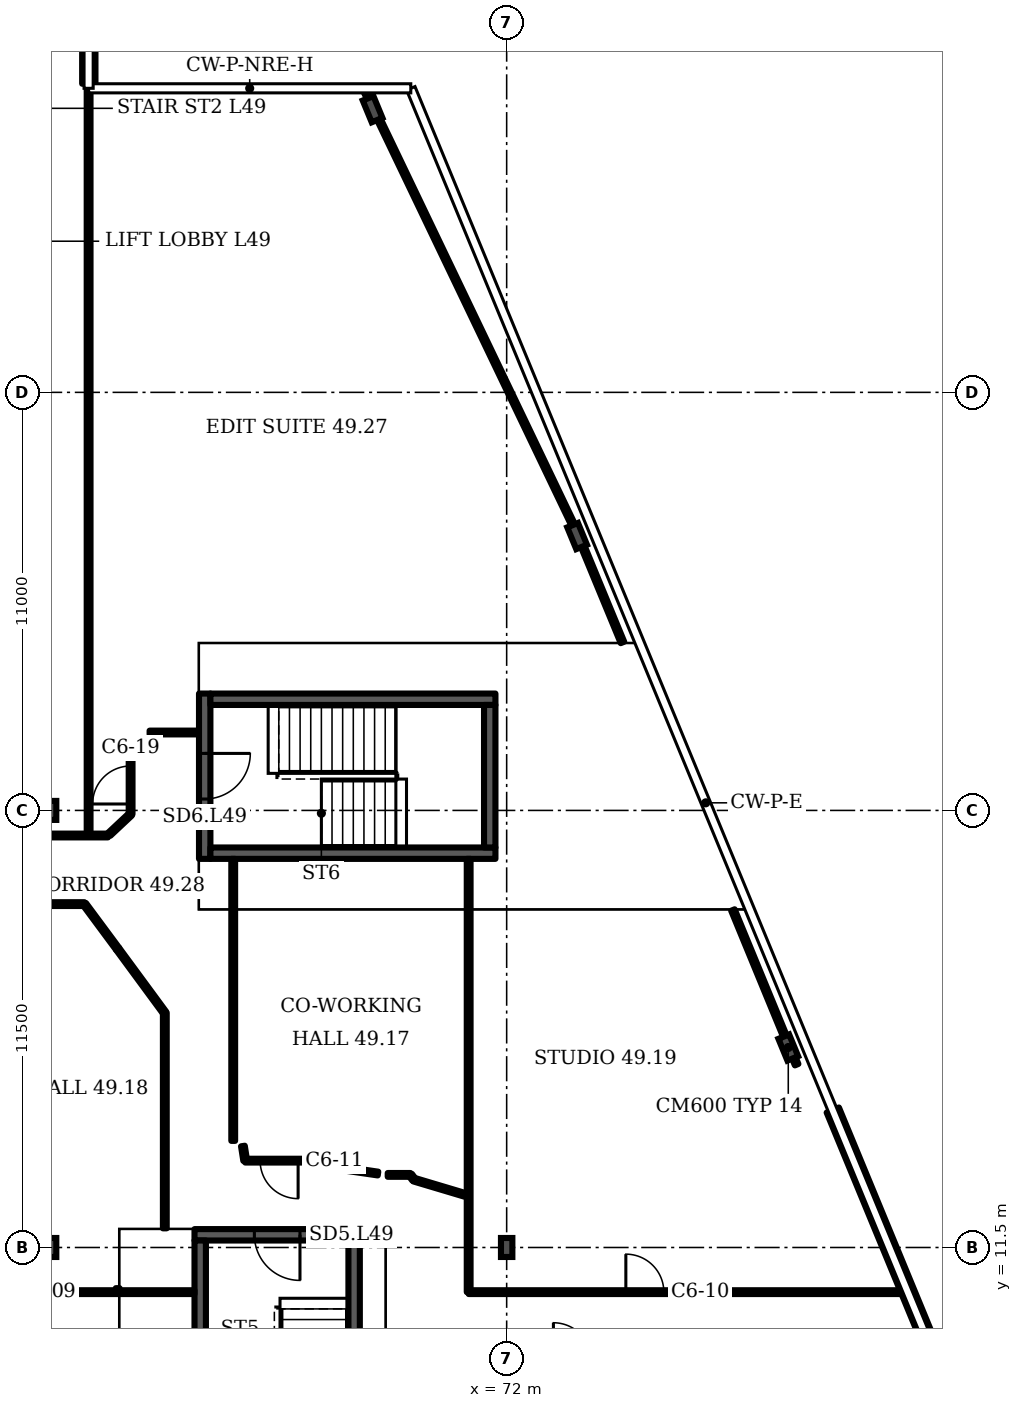
"""IFC4 building model, lengths in metres.
Left out: names, types, materials, properties, quantities, classifications, styles, units other than length and angle.
Written with IfcOpenShell. Run it as: python <this file> out.ifc"""

import sys

from ifc_helpers import new_model, si_unit, direction, frame, frame_2d, origin, origin_2d, place, context, subcontext, project, spatial, rectangle, i_section, extrude, element, fill, save


model = new_model("IFC4")
c1 = context("Model", 3, precision=1e-05, world=origin(), true_north=direction((0.0, 1.0)))
c2 = subcontext(c1, "Body", "Model", "MODEL_VIEW")
j1 = project(units=[si_unit("LENGTHUNIT", "METRE"), si_unit("PLANEANGLEUNIT", "RADIAN")], contexts=[c1])
p1 = place(None, origin())
s1 = spatial("IfcSite", under=j1, at=p1, CompositionType="ELEMENT")
p2 = place(p1, origin())
s2 = spatial("IfcBuilding", under=s1, at=p2, CompositionType="ELEMENT")
p3 = place(p2, frame((0.0, 0.0, 198.7)))
s3 = spatial("IfcBuildingStorey", under=s2, at=p3, CompositionType="ELEMENT", Elevation=198.7)
for number, where, z_axis, x_axis in (
    (1, (79.41, 16.762, 0.0), (0.0, 0.0, 1.0), (0.924, 0.382, 0.0)),
    (2, (73.854, 30.219, 0.0), (0.0, 0.0, 1.0), (0.924, 0.382, 0.0)),
    (3, (68.472, 41.45, 0.0), (0.0, 0.0, 1.0), (0.924, 0.382, 0.0)),
):
    element("IfcColumn", number, at=place(p3, frame(where, z_axis=z_axis, x_axis=x_axis)), inside=s3, PredefinedType="COLUMN", context=c2, shape_type="SweptSolid", body=[
        extrude(i_section(OverallWidth=0.305, OverallDepth=0.62, WebThickness=0.021, FlangeThickness=0.04, FilletRadius=0.027, at=origin_2d()), origin(), (0.0, 0.0, 1.0), 3.6),
    ])
for number, where, z_axis, x_axis in (
    (4, (60.0, 11.5, 0.0), (0.0, 0.0, 1.0), (1.0, 0.0, 0.0)),
    (5, (72.0, 11.5, 0.0), (0.0, 0.0, 1.0), (1.0, 0.0, 0.0)),
    (6, (60.0, 23.0, 0.0), (0.0, 0.0, 1.0), (1.0, 0.0, 0.0)),
):
    element("IfcColumn", number, at=place(p3, frame(where, z_axis=z_axis, x_axis=x_axis)), inside=s3, PredefinedType="COLUMN", context=c2, shape_type="SweptSolid", body=[
        extrude(i_section(OverallWidth=0.3, OverallDepth=0.5, WebThickness=0.014, FlangeThickness=0.028, FilletRadius=0.027, at=origin_2d()), origin(), (0.0, 0.0, 1.0), 3.6),
    ])
p4 = place(p3, frame((84.916, 4.616, 0.0), z_axis=(0.0, 0.0, 1.0), x_axis=(-0.381598, 0.924328, 0.0)))
e7 = element("IfcWall", 7, at=p4, inside=s3, PredefinedType="SOLIDWALL", context=c2, shape_type="SweptSolid", body=[
    extrude(rectangle(XDim=11.361, YDim=0.35, at=frame_2d((5.68, 0.0))), origin(), (0.0, 0.0, 1.0), 1.0),
])
p5 = place(p3, frame((61.005, 42.12, 0.0), z_axis=(0.0, 0.0, 1.0), x_axis=(0.0, 1.0, 0.0)))
e8 = element("IfcWall", 8, at=p5, inside=s3, PredefinedType="SOLIDWALL", context=c2, shape_type="SweptSolid", body=[
    extrude(rectangle(XDim=2.03, YDim=0.35, at=frame_2d((1.015, 0.0))), origin(), (0.0, 0.0, 1.0), 1.0),
])
p6 = place(p3, frame((63.786, 11.834, 0.0), z_axis=(0.0, 0.0, 1.0), x_axis=(1.0, 0.0, 0.0)))
e9 = element("IfcWall", 9, at=p6, inside=s3, PredefinedType="SHEAR", context=c2, shape_type="SweptSolid", body=[
    extrude(rectangle(XDim=4.35, YDim=0.3, at=frame_2d((2.175, 0.0))), origin(), (0.0, 0.0, 1.0), 3.15),
])
p7 = place(p6, frame((1.575, 0.0, 0.0)))
e10 = element("IfcOpeningElement", 10, at=p7, cuts=e9, PredefinedType="OPENING", context=c2, shape_type="SweptSolid", body=[
    extrude(rectangle(XDim=1.2, YDim=2.1, at=frame_2d((0.6, 1.05))), frame((0.0, 0.16, 0.0), z_axis=(0.0, -1.0, 0.0), x_axis=(1.0, 0.0, 0.0)), (0.0, 0.0, 1.0), 0.32),
])
p8 = place(p3, frame((64.055, 21.725, 0.0), z_axis=(0.0, 0.0, 1.0), x_axis=(0.0, 1.0, 0.0)))
e11 = element("IfcWall", 11, at=p8, inside=s3, PredefinedType="SHEAR", context=c2, shape_type="SweptSolid", body=[
    extrude(rectangle(XDim=4.35, YDim=0.3, at=frame_2d((2.175, 0.0))), origin(), (0.0, 0.0, 1.0), 3.15),
])
p9 = place(p8, frame((1.575, 0.0, 0.0)))
e12 = element("IfcOpeningElement", 12, at=p9, cuts=e11, PredefinedType="OPENING", context=c2, shape_type="SweptSolid", body=[
    extrude(rectangle(XDim=1.2, YDim=2.1, at=frame_2d((0.6, 1.05))), frame((0.0, 0.16, 0.0), z_axis=(0.0, -1.0, 0.0), x_axis=(1.0, 0.0, 0.0)), (0.0, 0.0, 1.0), 0.32),
])
p10 = place(p3, frame((18.955, 22.34, 0.0), z_axis=(0.0, 0.0, 1.0), x_axis=(1.0, 0.0, 0.0)))
e13 = element("IfcWall", 13, at=p10, inside=s3, PredefinedType="PARTITIONING", context=c2, shape_type="SweptSolid", body=[
    extrude(rectangle(XDim=42.555, YDim=0.1, at=frame_2d((21.277, 0.0))), origin(), (0.0, 0.0, 1.0), 3.15),
])
p11 = place(p10, frame((0.62, 0.0, 0.0)))
e14 = element("IfcOpeningElement", 14, at=p11, cuts=e13, PredefinedType="OPENING", context=c2, shape_type="SweptSolid", body=[
    extrude(rectangle(XDim=1.0, YDim=2.1, at=frame_2d((0.5, 1.05))), frame((0.0, 0.06, 0.0), z_axis=(0.0, -1.0, 0.0), x_axis=(1.0, 0.0, 0.0)), (0.0, 0.0, 1.0), 0.12),
])
p12 = place(p10, frame((8.62, 0.0, 0.0)))
e15 = element("IfcOpeningElement", 15, at=p12, cuts=e13, PredefinedType="OPENING", context=c2, shape_type="SweptSolid", body=[
    extrude(rectangle(XDim=1.0, YDim=2.1, at=frame_2d((0.5, 1.05))), frame((0.0, 0.06, 0.0), z_axis=(0.0, -1.0, 0.0), x_axis=(1.0, 0.0, 0.0)), (0.0, 0.0, 1.0), 0.12),
])
p13 = place(p3, frame((34.945, 10.325, 0.0), z_axis=(0.0, 0.0, 1.0), x_axis=(1.0, 0.0, 0.0)))
e16 = element("IfcWall", 16, at=p13, inside=s3, PredefinedType="PARTITIONING", context=c2, shape_type="SweptSolid", body=[
    extrude(rectangle(XDim=28.841, YDim=0.1, at=frame_2d((14.421, 0.0))), origin(), (0.0, 0.0, 1.0), 3.15),
])
p14 = place(p13, frame((22.995, 0.0, 0.0)))
e17 = element("IfcOpeningElement", 17, at=p14, cuts=e16, PredefinedType="OPENING", context=c2, shape_type="SweptSolid", body=[
    extrude(rectangle(XDim=1.0, YDim=2.1, at=frame_2d((0.5, 1.05))), frame((0.0, 0.06, 0.0), z_axis=(0.0, -1.0, 0.0), x_axis=(1.0, 0.0, 0.0)), (0.0, 0.0, 1.0), 0.12),
])
p15 = place(p3, frame((34.945, 20.535, 0.0), z_axis=(0.0, 0.0, 1.0), x_axis=(1.0, 0.0, 0.0)))
e18 = element("IfcWall", 18, at=p15, inside=s3, PredefinedType="PARTITIONING", context=c2, shape_type="SweptSolid", body=[
    extrude(rectangle(XDim=25.945, YDim=0.1, at=frame_2d((12.972, 0.0))), origin(), (0.0, 0.0, 1.0), 3.15),
])
p16 = place(p15, frame((3.5, 0.0, 0.0)))
e19 = element("IfcOpeningElement", 19, at=p16, cuts=e18, PredefinedType="OPENING", context=c2, shape_type="SweptSolid", body=[
    extrude(rectangle(XDim=1.0, YDim=2.1, at=frame_2d((0.5, 1.05))), frame((0.0, 0.06, 0.0), z_axis=(0.0, -1.0, 0.0), x_axis=(1.0, 0.0, 0.0)), (0.0, 0.0, 1.0), 0.12),
])
p17 = place(p15, frame((13.075, 0.0, 0.0)))
e20 = element("IfcOpeningElement", 20, at=p17, cuts=e18, PredefinedType="OPENING", context=c2, shape_type="SweptSolid", body=[
    extrude(rectangle(XDim=1.8, YDim=2.1, at=frame_2d((0.9, 1.05))), frame((0.0, 0.06, 0.0), z_axis=(0.0, -1.0, 0.0), x_axis=(1.0, 0.0, 0.0)), (0.0, 0.0, 1.0), 0.12),
])
p18 = place(p3, frame((61.0, 22.34, 0.0), z_axis=(0.0, 0.0, 1.0), x_axis=(0.0, 1.0, 0.0)))
e21 = element("IfcWall", 21, at=p18, inside=s3, PredefinedType="PARTITIONING", context=c2, shape_type="SweptSolid", body=[
    extrude(rectangle(XDim=19.64, YDim=0.1, at=frame_2d((9.82, 0.0))), origin(), (0.0, 0.0, 1.0), 3.15),
])
p19 = place(p3, frame((61.54, 22.37, 0.0), z_axis=(0.0, 0.0, 1.0), x_axis=(0.72944, 0.684047, 0.0)))
e22 = element("IfcWall", 22, at=p19, inside=s3, PredefinedType="PARTITIONING", context=c2, shape_type="SweptSolid", body=[
    extrude(rectangle(XDim=0.774, YDim=0.1, at=frame_2d((0.387, 0.0))), origin(), (0.0, 0.0, 1.0), 3.15),
])
p20 = place(p3, frame((61.765, 10.325, 0.0), z_axis=(0.0, 0.0, 1.0), x_axis=(0.0, 1.0, 0.0)))
e23 = element("IfcWall", 23, at=p20, inside=s3, PredefinedType="PARTITIONING", context=c2, shape_type="SweptSolid", body=[
    extrude(rectangle(XDim=0.105, YDim=0.1, at=frame_2d((0.052, 0.0))), origin(), (0.0, 0.0, 1.0), 3.15),
])
p21 = place(p3, frame((61.765, 19.355, 0.0), z_axis=(0.0, 0.0, 1.0), x_axis=(-0.595656, 0.803238, 0.0)))
e24 = element("IfcWall", 24, at=p21, inside=s3, PredefinedType="PARTITIONING", context=c2, shape_type="SweptSolid", body=[
    extrude(rectangle(XDim=1.469, YDim=0.1, at=frame_2d((0.734, 0.0))), origin(), (0.0, 0.0, 1.0), 3.15),
])
p22 = place(p3, frame((62.105, 22.9, 0.0), z_axis=(0.0, 0.0, 1.0), x_axis=(0.0, 1.0, 0.0)))
e25 = element("IfcWall", 25, at=p22, inside=s3, PredefinedType="PARTITIONING", context=c2, shape_type="SweptSolid", body=[
    extrude(rectangle(XDim=1.9, YDim=0.1, at=frame_2d((0.95, 0.0))), origin(), (0.0, 0.0, 1.0), 3.15),
])
p23 = place(p22, frame((0.269, 0.0, 0.0)))
e26 = element("IfcOpeningElement", 26, at=p23, cuts=e25, PredefinedType="OPENING", context=c2, shape_type="SweptSolid", body=[
    extrude(rectangle(XDim=1.0, YDim=2.1, at=frame_2d((0.5, 1.05))), frame((0.0, 0.06, 0.0), z_axis=(0.0, -1.0, 0.0), x_axis=(1.0, 0.0, 0.0)), (0.0, 0.0, 1.0), 0.12),
])
p24 = place(p3, frame((62.105, 24.8, 0.0), z_axis=(0.0, 0.0, 1.0), x_axis=(1.0, 0.0, 0.0)))
e27 = element("IfcWall", 27, at=p24, inside=s3, PredefinedType="PARTITIONING", context=c2, shape_type="SweptSolid", body=[
    extrude(rectangle(XDim=0.38, YDim=0.1, at=frame_2d((0.19, 0.0))), origin(), (0.0, 0.0, 1.0), 3.15),
])
p25 = place(p3, frame((62.605, 25.05, 0.0), z_axis=(0.0, 0.0, 1.0), x_axis=(1.0, 0.0, 0.0)))
e28 = element("IfcWall", 28, at=p25, inside=s3, PredefinedType="PARTITIONING", context=c2, shape_type="SweptSolid", body=[
    extrude(rectangle(XDim=1.28, YDim=0.1, at=frame_2d((0.64, 0.0))), origin(), (0.0, 0.0, 1.0), 3.15),
])
p26 = place(p3, frame((63.005, 17.67, 0.0), z_axis=(0.0, 0.0, 1.0), x_axis=(-0.592694, 0.805429, 0.0)))
e29 = element("IfcWall", 29, at=p26, inside=s3, PredefinedType="PARTITIONING", context=c2, shape_type="SweptSolid", body=[
    extrude(rectangle(XDim=2.092, YDim=0.1, at=frame_2d((1.046, 0.0))), origin(), (0.0, 0.0, 1.0), 3.15),
])
p27 = place(p3, frame((63.005, 12.004, 0.0), z_axis=(0.0, 0.0, 1.0), x_axis=(0.0, 1.0, 0.0)))
e30 = element("IfcWall", 30, at=p27, inside=s3, PredefinedType="PARTITIONING", context=c2, shape_type="SweptSolid", body=[
    extrude(rectangle(XDim=5.666, YDim=0.1, at=frame_2d((2.833, 0.0))), origin(), (0.0, 0.0, 1.0), 3.15),
])
p28 = place(p3, frame((64.805, 14.305, 0.0), z_axis=(0.0, 0.0, 1.0), x_axis=(0.0, 1.0, 0.0)))
e31 = element("IfcWall", 31, at=p28, inside=s3, PredefinedType="PARTITIONING", context=c2, shape_type="SweptSolid", body=[
    extrude(rectangle(XDim=7.42, YDim=0.1, at=frame_2d((3.71, 0.0))), origin(), (0.0, 0.0, 1.0), 3.15),
])
p29 = place(p3, frame((65.12, 13.785, 0.0), z_axis=(0.0, 0.0, 1.0), x_axis=(-0.154128, 0.988048, 0.0)))
e32 = element("IfcWall", 32, at=p29, inside=s3, PredefinedType="PARTITIONING", context=c2, shape_type="SweptSolid", body=[
    extrude(rectangle(XDim=0.39, YDim=0.1, at=frame_2d((0.195, 0.0))), origin(), (0.0, 0.0, 1.0), 3.15),
])
p30 = place(p3, frame((65.12, 13.785, 0.0), z_axis=(0.0, 0.0, 1.0), x_axis=(1.0, 0.0, 0.0)))
e33 = element("IfcWall", 33, at=p30, inside=s3, PredefinedType="PARTITIONING", context=c2, shape_type="SweptSolid", body=[
    extrude(rectangle(XDim=1.74, YDim=0.1, at=frame_2d((0.87, 0.0))), origin(), (0.0, 0.0, 1.0), 3.15),
])
p31 = place(p30, frame((0.392, 0.0, 0.0)))
e34 = element("IfcOpeningElement", 34, at=p31, cuts=e33, PredefinedType="OPENING", context=c2, shape_type="SweptSolid", body=[
    extrude(rectangle(XDim=1.0, YDim=2.1, at=frame_2d((0.5, 1.05))), frame((0.0, 0.06, 0.0), z_axis=(0.0, -1.0, 0.0), x_axis=(1.0, 0.0, 0.0)), (0.0, 0.0, 1.0), 0.12),
])
p32 = place(p3, frame((66.975, 13.685, 0.0), z_axis=(0.0, 0.0, 1.0), x_axis=(-0.755051, 0.65566, 0.0)))
e35 = element("IfcWall", 35, at=p32, inside=s3, PredefinedType="PARTITIONING", context=c2, shape_type="SweptSolid", body=[
    extrude(rectangle(XDim=0.152, YDim=0.1, at=frame_2d((0.076, 0.0))), origin(), (0.0, 0.0, 1.0), 3.15),
])
p33 = place(p3, frame((68.615, 13.445, 0.0), z_axis=(0.0, 0.0, 1.0), x_axis=(-0.989463, 0.144803, 0.0)))
e36 = element("IfcWall", 36, at=p33, inside=s3, PredefinedType="PARTITIONING", context=c2, shape_type="SweptSolid", body=[
    extrude(rectangle(XDim=1.657, YDim=0.1, at=frame_2d((0.829, 0.0))), origin(), (0.0, 0.0, 1.0), 3.15),
])
p34 = place(p3, frame((68.87, 13.41, 0.0), z_axis=(0.0, 0.0, 1.0), x_axis=(1.0, 0.0, 0.0)))
e37 = element("IfcWall", 37, at=p34, inside=s3, PredefinedType="PARTITIONING", context=c2, shape_type="SweptSolid", body=[
    extrude(rectangle(XDim=0.595, YDim=0.1, at=frame_2d((0.297, 0.0))), origin(), (0.0, 0.0, 1.0), 3.15),
])
p35 = place(p3, frame((69.56, 13.285, 0.0), z_axis=(0.0, 0.0, 1.0), x_axis=(-0.604968, 0.796256, 0.0)))
e38 = element("IfcWall", 38, at=p35, inside=s3, PredefinedType="PARTITIONING", context=c2, shape_type="SweptSolid", body=[
    extrude(rectangle(XDim=0.157, YDim=0.1, at=frame_2d((0.079, 0.0))), origin(), (0.0, 0.0, 1.0), 3.15),
])
p36 = place(p3, frame((70.9, 12.885, 0.0), z_axis=(0.0, 0.0, 1.0), x_axis=(-0.958229, 0.286002, 0.0)))
e39 = element("IfcWall", 39, at=p36, inside=s3, PredefinedType="PARTITIONING", context=c2, shape_type="SweptSolid", body=[
    extrude(rectangle(XDim=1.398, YDim=0.1, at=frame_2d((0.699, 0.0))), origin(), (0.0, 0.0, 1.0), 3.15),
])
p37 = place(p3, frame((71.0, 10.325, 0.0), z_axis=(0.0, 0.0, 1.0), x_axis=(0.0, 1.0, 0.0)))
e40 = element("IfcWall", 40, at=p37, inside=s3, PredefinedType="PARTITIONING", context=c2, shape_type="SweptSolid", body=[
    extrude(rectangle(XDim=11.4, YDim=0.1, at=frame_2d((5.7, 0.0))), origin(), (0.0, 0.0, 1.0), 3.15),
])
p38 = place(p3, frame((71.0, 10.325, 0.0), z_axis=(0.0, 0.0, 1.0), x_axis=(1.0, 0.0, 0.0)))
e41 = element("IfcWall", 41, at=p38, inside=s3, PredefinedType="PARTITIONING", context=c2, shape_type="SweptSolid", body=[
    extrude(rectangle(XDim=11.532, YDim=0.1, at=frame_2d((5.766, 0.0))), origin(), (0.0, 0.0, 1.0), 2.53),
])
p39 = place(p38, frame((4.136, 0.0, 0.0)))
e42 = element("IfcOpeningElement", 42, at=p39, cuts=e41, PredefinedType="OPENING", context=c2, shape_type="SweptSolid", body=[
    extrude(rectangle(XDim=1.0, YDim=2.1, at=frame_2d((0.5, 1.05))), frame((0.0, 0.06, 0.0), z_axis=(0.0, -1.0, 0.0), x_axis=(1.0, 0.0, 0.0)), (0.0, 0.0, 1.0), 0.12),
])
p40 = place(p3, frame((73.885, 30.23, 0.0), z_axis=(0.0, 0.0, 1.0), x_axis=(-0.432107, 0.901822, 0.0)))
e43 = element("IfcWall", 43, at=p40, inside=s3, PredefinedType="PARTITIONING", context=c2, shape_type="SweptSolid", body=[
    extrude(rectangle(XDim=13.016, YDim=0.1, at=frame_2d((6.508, 0.0))), origin(), (0.0, 0.0, 1.0), 3.15),
])
p41 = place(p3, frame((75.047, 27.42, 0.0), z_axis=(0.0, 0.0, 1.0), x_axis=(-0.382024, 0.924148, 0.0)))
e44 = element("IfcWall", 44, at=p41, inside=s3, PredefinedType="PARTITIONING", context=c2, shape_type="SweptSolid", body=[
    extrude(rectangle(XDim=3.041, YDim=0.1, at=frame_2d((1.521, 0.0))), origin(), (0.0, 0.0, 1.0), 2.53),
])
p42 = place(p3, frame((79.63, 16.31, 0.0), z_axis=(0.0, 0.0, 1.0), x_axis=(-0.380933, 0.9246, 0.0)))
e45 = element("IfcWall", 45, at=p42, inside=s3, PredefinedType="PARTITIONING", context=c2, shape_type="SweptSolid", body=[
    extrude(rectangle(XDim=4.402, YDim=0.1, at=frame_2d((2.201, 0.0))), origin(), (0.0, 0.0, 1.0), 2.53),
])
for number, where, z_axis, x_axis in (
    (46, (63.936, 4.184, 0.0), (0.0, 0.0, 1.0), (0.0, 1.0, 0.0)),
    (47, (67.986, 4.184, 0.0), (0.0, 0.0, 1.0), (0.0, 1.0, 0.0)),
    (48, (64.205, 21.875, 0.0), (0.0, 0.0, 1.0), (1.0, 0.0, 0.0)),
    (49, (64.205, 25.925, 0.0), (0.0, 0.0, 1.0), (1.0, 0.0, 0.0)),
):
    element("IfcWall", number, at=place(p3, frame(where, z_axis=z_axis, x_axis=x_axis)), inside=s3, PredefinedType="SHEAR", context=c2, shape_type="SweptSolid", body=[
        extrude(rectangle(XDim=7.5, YDim=0.3, at=frame_2d((3.75, 0.0))), origin(), (0.0, 0.0, 1.0), 3.15),
    ])
p43 = place(p3, frame((71.555, 22.025, 0.0), z_axis=(0.0, 0.0, 1.0), x_axis=(0.0, 1.0, 0.0)))
e50 = element("IfcWall", 50, at=p43, inside=s3, PredefinedType="SHEAR", context=c2, shape_type="SweptSolid", body=[
    extrude(rectangle(XDim=3.75, YDim=0.3, at=frame_2d((1.875, 0.0))), origin(), (0.0, 0.0, 1.0), 3.15),
])
p44 = place(p7, origin())
e51 = element("IfcDoor", 51, at=p44, inside=s3, OperationType="SINGLE_SWING_RIGHT", PredefinedType="DOOR", context=c2, shape_type="SweptSolid", body=[
    extrude(rectangle(XDim=1.2, YDim=2.1, at=frame_2d((0.6, 1.05))), frame((0.0, 0.025, 0.0), z_axis=(0.0, -1.0, 0.0), x_axis=(1.0, 0.0, 0.0)), (0.0, 0.0, 1.0), 0.05),
])
fill(e10, e51)
p45 = place(p9, origin())
e52 = element("IfcDoor", 52, at=p45, inside=s3, OperationType="SINGLE_SWING_RIGHT", PredefinedType="DOOR", context=c2, shape_type="SweptSolid", body=[
    extrude(rectangle(XDim=1.2, YDim=2.1, at=frame_2d((0.6, 1.05))), frame((0.0, 0.025, 0.0), z_axis=(0.0, -1.0, 0.0), x_axis=(1.0, 0.0, 0.0)), (0.0, 0.0, 1.0), 0.05),
])
fill(e12, e52)
p46 = place(p39, origin())
e53 = element("IfcDoor", 53, at=p46, inside=s3, OperationType="SINGLE_SWING_LEFT", PredefinedType="DOOR", context=c2, shape_type="SweptSolid", body=[
    extrude(rectangle(XDim=1.0, YDim=2.1, at=frame_2d((0.5, 1.05))), frame((0.0, 0.025, 0.0), z_axis=(0.0, -1.0, 0.0), x_axis=(1.0, 0.0, 0.0)), (0.0, 0.0, 1.0), 0.05),
])
fill(e42, e53)
p47 = place(p31, origin())
e54 = element("IfcDoor", 54, at=p47, inside=s3, OperationType="SINGLE_SWING_RIGHT", PredefinedType="DOOR", context=c2, shape_type="SweptSolid", body=[
    extrude(rectangle(XDim=1.0, YDim=2.1, at=frame_2d((0.5, 1.05))), frame((0.0, 0.025, 0.0), z_axis=(0.0, -1.0, 0.0), x_axis=(1.0, 0.0, 0.0)), (0.0, 0.0, 1.0), 0.05),
])
fill(e34, e54)
p48 = place(p23, origin())
e55 = element("IfcDoor", 55, at=p48, inside=s3, OperationType="SINGLE_SWING_LEFT", PredefinedType="DOOR", context=c2, shape_type="SweptSolid", body=[
    extrude(rectangle(XDim=1.0, YDim=2.1, at=frame_2d((0.5, 1.05))), frame((0.0, 0.025, 0.0), z_axis=(0.0, -1.0, 0.0), x_axis=(1.0, 0.0, 0.0)), (0.0, 0.0, 1.0), 0.05),
])
fill(e26, e55)
save(model, sys.argv[1])
